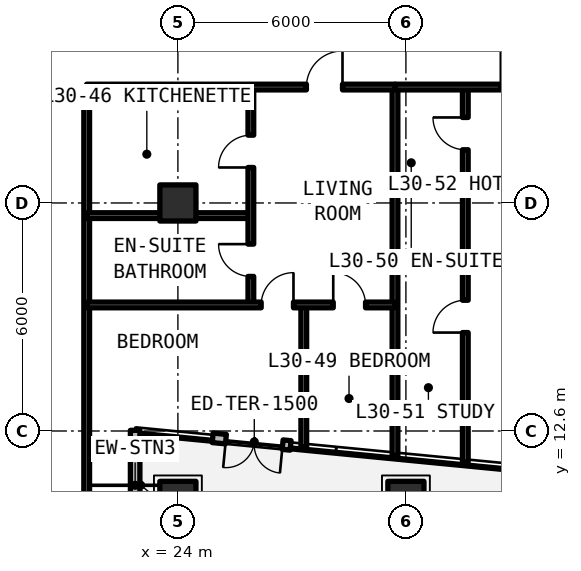
"""IFC4 building model, lengths in metres.
Left out: names, types, materials, properties, quantities, classifications, styles, units other than length and angle.
Written with IfcOpenShell. Run it as: python <this file> out.ifc"""

import sys

from ifc_helpers import new_model, si_unit, direction, frame, frame_2d, origin, origin_2d, place, context, subcontext, project, spatial, rectangle, extrude, element, fill, save


model = new_model("IFC4")
c1 = context("Model", 3, precision=1e-05, world=origin(), true_north=direction((0.0, 1.0)))
c2 = subcontext(c1, "Body", "Model", "MODEL_VIEW")
j1 = project(units=[si_unit("LENGTHUNIT", "METRE"), si_unit("PLANEANGLEUNIT", "RADIAN")], contexts=[c1])
p1 = place(None, origin())
s1 = spatial("IfcSite", under=j1, at=p1, CompositionType="ELEMENT")
p2 = place(p1, origin())
s2 = spatial("IfcBuilding", under=s1, at=p2, CompositionType="ELEMENT")
p3 = place(p2, frame((0.0, 0.0, 108.57)))
s3 = spatial("IfcBuildingStorey", under=s2, at=p3, CompositionType="ELEMENT", Elevation=108.57)
for number, where, z_axis, x_axis in (
    (1, (24.0, 18.6, 0.0), (0.0, 0.0, 1.0), (1.0, 0.0, 0.0)),
    (2, (24.0, 10.8, 0.0), (0.0, 0.0, 1.0), (1.0, 0.0, 0.0)),
    (3, (30.0, 10.8, 0.0), (0.0, 0.0, 1.0), (1.0, 0.0, 0.0)),
):
    element("IfcColumn", number, at=place(p3, frame(where, z_axis=z_axis, x_axis=x_axis)), inside=s3, PredefinedType="COLUMN", context=c2, shape_type="SweptSolid", body=[
        extrude(rectangle(XDim=0.95, YDim=0.95, at=origin_2d()), origin(), (0.0, 0.0, 1.0), 3.63),
    ])
p4 = place(p3, frame((22.875, 9.725, 0.0), z_axis=(0.0, 0.0, 1.0), x_axis=(0.0, 1.0, 0.0)))
e4 = element("IfcWall", 4, at=p4, inside=s3, PredefinedType="SOLIDWALL", context=c2, shape_type="SweptSolid", body=[
    extrude(rectangle(XDim=2.893, YDim=0.25, at=frame_2d((1.446, 0.0))), origin(), (0.0, 0.0, 1.0), 3.41),
])
p5 = place(p3, frame((24.915, 12.42, 0.0), z_axis=(0.0, 0.0, 1.0), x_axis=(0.995313658776, -0.096699124367, 0.0)))
e5 = element("IfcWall", 5, at=p5, inside=s3, PredefinedType="SOLIDWALL", context=c2, shape_type="SweptSolid", body=[
    extrude(rectangle(XDim=2.06, YDim=0.25, at=frame_2d((1.03, 0.0))), origin(), (0.0, 0.0, 1.0), 3.41),
])
p6 = place(p5, frame((0.35, 0.0, 0.0)))
e6 = element("IfcOpeningElement", 6, at=p6, cuts=e5, PredefinedType="OPENING", context=c2, shape_type="SweptSolid", body=[
    extrude(rectangle(XDim=1.5, YDim=2.2, at=frame_2d((0.75, 1.1))), frame((0.0, 0.135, 0.0), z_axis=(0.0, -1.0, 0.0), x_axis=(1.0, 0.0, 0.0)), (0.0, 0.0, 1.0), 0.27),
])
p7 = place(p3, frame((21.6, 9.725, 0.0), z_axis=(0.0, 0.0, 1.0), x_axis=(0.0, 1.0, 0.0)))
e7 = element("IfcWall", 7, at=p7, inside=s3, PredefinedType="SOLIDWALL", context=c2, shape_type="SweptSolid", body=[
    extrude(rectangle(XDim=11.925, YDim=0.15, at=frame_2d((5.962, 0.0))), origin(), (0.0, 0.0, 1.0), 2.63),
])
p8 = place(p3, frame((29.713, 11.954, 0.0), z_axis=(0.0, 0.0, 1.0), x_axis=(0.0, 1.0, 0.0)))
e8 = element("IfcWall", 8, at=p8, inside=s3, PredefinedType="SOLIDWALL", context=c2, shape_type="SweptSolid", body=[
    extrude(rectangle(XDim=9.696, YDim=0.15, at=frame_2d((4.848, 0.0))), origin(), (0.0, 0.0, 1.0), 2.63),
])
p9 = place(p3, frame((21.6, 18.267, 0.0), z_axis=(0.0, 0.0, 1.0), x_axis=(1.0, 0.0, 0.0)))
e9 = element("IfcWall", 9, at=p9, inside=s3, PredefinedType="PARTITIONING", context=c2, shape_type="SweptSolid", body=[
    extrude(rectangle(XDim=4.32, YDim=0.15, at=frame_2d((2.16, 0.0))), origin(), (0.0, 0.0, 1.0), 2.63),
])
p10 = place(p3, frame((25.92, 15.917, 0.0), z_axis=(0.0, 0.0, 1.0), x_axis=(0.0, 1.0, 0.0)))
e10 = element("IfcWall", 10, at=p10, inside=s3, PredefinedType="PARTITIONING", context=c2, shape_type="SweptSolid", body=[
    extrude(rectangle(XDim=5.733, YDim=0.15, at=frame_2d((2.867, 0.0))), origin(), (0.0, 0.0, 1.0), 2.63),
])
p11 = place(p10, frame((0.75, 0.0, 0.0)))
e11 = element("IfcOpeningElement", 11, at=p11, cuts=e10, PredefinedType="OPENING", context=c2, shape_type="SweptSolid", body=[
    extrude(rectangle(XDim=0.85, YDim=2.1, at=frame_2d((0.425, 1.05))), frame((0.0, 0.085, 0.0), z_axis=(0.0, -1.0, 0.0), x_axis=(1.0, 0.0, 0.0)), (0.0, 0.0, 1.0), 0.17),
])
p12 = place(p10, frame((3.617, 0.0, 0.0)))
e12 = element("IfcOpeningElement", 12, at=p12, cuts=e10, PredefinedType="OPENING", context=c2, shape_type="SweptSolid", body=[
    extrude(rectangle(XDim=0.85, YDim=2.1, at=frame_2d((0.425, 1.05))), frame((0.0, 0.085, 0.0), z_axis=(0.0, -1.0, 0.0), x_axis=(1.0, 0.0, 0.0)), (0.0, 0.0, 1.0), 0.17),
])
p13 = place(p3, frame((27.313, 12.187, 0.0), z_axis=(0.0, 0.0, 1.0), x_axis=(0.0, 1.0, 0.0)))
e13 = element("IfcWall", 13, at=p13, inside=s3, PredefinedType="PARTITIONING", context=c2, shape_type="SweptSolid", body=[
    extrude(rectangle(XDim=3.73, YDim=0.15, at=frame_2d((1.865, 0.0))), origin(), (0.0, 0.0, 1.0), 2.63),
])
p14 = place(p3, frame((21.6, 15.917, 0.0), z_axis=(0.0, 0.0, 1.0), x_axis=(1.0, 0.0, 0.0)))
e14 = element("IfcWall", 14, at=p14, inside=s3, PredefinedType="PARTITIONING", context=c2, shape_type="SweptSolid", body=[
    extrude(rectangle(XDim=8.113, YDim=0.15, at=frame_2d((4.056, 0.0))), origin(), (0.0, 0.0, 1.0), 2.63),
])
p15 = place(p14, frame((4.591, 0.0, 0.0)))
e15 = element("IfcOpeningElement", 15, at=p15, cuts=e14, PredefinedType="OPENING", context=c2, shape_type="SweptSolid", body=[
    extrude(rectangle(XDim=0.85, YDim=2.1, at=frame_2d((0.425, 1.05))), frame((0.0, 0.085, 0.0), z_axis=(0.0, -1.0, 0.0), x_axis=(1.0, 0.0, 0.0)), (0.0, 0.0, 1.0), 0.17),
])
p16 = place(p14, frame((6.488, 0.0, 0.0)))
e16 = element("IfcOpeningElement", 16, at=p16, cuts=e14, PredefinedType="OPENING", context=c2, shape_type="SweptSolid", body=[
    extrude(rectangle(XDim=0.85, YDim=2.1, at=frame_2d((0.425, 1.05))), frame((0.0, 0.085, 0.0), z_axis=(0.0, -1.0, 0.0), x_axis=(1.0, 0.0, 0.0)), (0.0, 0.0, 1.0), 0.17),
])
p17 = place(p3, frame((21.6, 21.65, 0.0), z_axis=(0.0, 0.0, 1.0), x_axis=(1.0, 0.0, 0.0)))
e17 = element("IfcWall", 17, at=p17, inside=s3, PredefinedType="SOLIDWALL", context=c2, shape_type="SweptSolid", body=[
    extrude(rectangle(XDim=8.113, YDim=0.15, at=frame_2d((4.056, 0.0))), origin(), (0.0, 0.0, 1.0), 2.63),
])
p18 = place(p17, frame((5.781, 0.0, 0.0)))
e18 = element("IfcOpeningElement", 18, at=p18, cuts=e17, PredefinedType="OPENING", context=c2, shape_type="SweptSolid", body=[
    extrude(rectangle(XDim=0.95, YDim=2.15, at=frame_2d((0.475, 1.075))), frame((0.0, 0.085, 0.0), z_axis=(0.0, -1.0, 0.0), x_axis=(1.0, 0.0, 0.0)), (0.0, 0.0, 1.0), 0.17),
])
p19 = place(p3, frame((29.713, 19.2, 0.0), z_axis=(0.0, 0.0, 1.0), x_axis=(1.0, 0.0, 0.0)))
e19 = element("IfcWall", 19, at=p19, inside=s3, PredefinedType="PARTITIONING", context=c2, shape_type="SweptSolid", body=[
    extrude(rectangle(XDim=1.85, YDim=0.15, at=frame_2d((0.925, 0.0))), origin(), (0.0, 0.0, 1.0), 2.63),
])
p20 = place(p3, frame((31.563, 11.774, 0.0), z_axis=(0.0, 0.0, 1.0), x_axis=(0.0, 1.0, 0.0)))
e20 = element("IfcWall", 20, at=p20, inside=s3, PredefinedType="PARTITIONING", context=c2, shape_type="SweptSolid", body=[
    extrude(rectangle(XDim=9.875, YDim=0.15, at=frame_2d((4.938, 0.0))), origin(), (0.0, 0.0, 1.0), 2.63),
])
p21 = place(p20, frame((3.416, 0.0, 0.0)))
e21 = element("IfcOpeningElement", 21, at=p21, cuts=e20, PredefinedType="OPENING", context=c2, shape_type="SweptSolid", body=[
    extrude(rectangle(XDim=0.85, YDim=2.1, at=frame_2d((0.425, 1.05))), frame((0.0, 0.085, 0.0), z_axis=(0.0, -1.0, 0.0), x_axis=(1.0, 0.0, 0.0)), (0.0, 0.0, 1.0), 0.17),
])
p22 = place(p20, frame((8.226, 0.0, 0.0)))
e22 = element("IfcOpeningElement", 22, at=p22, cuts=e20, PredefinedType="OPENING", context=c2, shape_type="SweptSolid", body=[
    extrude(rectangle(XDim=0.85, YDim=2.1, at=frame_2d((0.425, 1.05))), frame((0.0, 0.085, 0.0), z_axis=(0.0, -1.0, 0.0), x_axis=(1.0, 0.0, 0.0)), (0.0, 0.0, 1.0), 0.17),
])
p23 = place(p3, frame((29.713, 21.65, 0.0), z_axis=(0.0, 0.0, 1.0), x_axis=(1.0, 0.0, 0.0)))
e23 = element("IfcWall", 23, at=p23, inside=s3, PredefinedType="SOLIDWALL", context=c2, shape_type="SweptSolid", body=[
    extrude(rectangle(XDim=4.589, YDim=0.15, at=frame_2d((2.294, 0.0))), origin(), (0.0, 0.0, 1.0), 2.63),
])
p24 = place(p23, frame((2.784, 0.0, 0.0)))
e24 = element("IfcOpeningElement", 24, at=p24, cuts=e23, PredefinedType="OPENING", context=c2, shape_type="SweptSolid", body=[
    extrude(rectangle(XDim=0.95, YDim=2.15, at=frame_2d((0.475, 1.075))), frame((0.0, 0.085, 0.0), z_axis=(0.0, -1.0, 0.0), x_axis=(1.0, 0.0, 0.0)), (0.0, 0.0, 1.0), 0.17),
])
p25 = place(p6, frame((1.5, 0.0, 0.0), z_axis=(0.0, 0.0, 1.0), x_axis=(-1.0, 0.0, 0.0)))
e25 = element("IfcDoor", 25, at=p25, inside=s3, OperationType="SINGLE_SWING_RIGHT", PredefinedType="DOOR", context=c2, shape_type="SweptSolid", body=[
    extrude(rectangle(XDim=1.5, YDim=2.2, at=frame_2d((0.75, 1.1))), frame((0.0, 0.025, 0.0), z_axis=(0.0, -1.0, 0.0), x_axis=(1.0, 0.0, 0.0)), (0.0, 0.0, 1.0), 0.05),
])
fill(e6, e25)
p26 = place(p11, origin())
e26 = element("IfcDoor", 26, at=p26, inside=s3, OperationType="SINGLE_SWING_RIGHT", PredefinedType="DOOR", context=c2, shape_type="SweptSolid", body=[
    extrude(rectangle(XDim=0.85, YDim=2.1, at=frame_2d((0.425, 1.05))), frame((0.0, 0.025, 0.0), z_axis=(0.0, -1.0, 0.0), x_axis=(1.0, 0.0, 0.0)), (0.0, 0.0, 1.0), 0.05),
])
fill(e11, e26)
p27 = place(p12, origin())
e27 = element("IfcDoor", 27, at=p27, inside=s3, OperationType="SINGLE_SWING_LEFT", PredefinedType="DOOR", context=c2, shape_type="SweptSolid", body=[
    extrude(rectangle(XDim=0.85, YDim=2.1, at=frame_2d((0.425, 1.05))), frame((0.0, 0.025, 0.0), z_axis=(0.0, -1.0, 0.0), x_axis=(1.0, 0.0, 0.0)), (0.0, 0.0, 1.0), 0.05),
])
fill(e12, e27)
p28 = place(p15, origin())
e28 = element("IfcDoor", 28, at=p28, inside=s3, OperationType="SINGLE_SWING_RIGHT", PredefinedType="DOOR", context=c2, shape_type="SweptSolid", body=[
    extrude(rectangle(XDim=0.85, YDim=2.1, at=frame_2d((0.425, 1.05))), frame((0.0, 0.025, 0.0), z_axis=(0.0, -1.0, 0.0), x_axis=(1.0, 0.0, 0.0)), (0.0, 0.0, 1.0), 0.05),
])
fill(e15, e28)
p29 = place(p16, origin())
e29 = element("IfcDoor", 29, at=p29, inside=s3, OperationType="SINGLE_SWING_LEFT", PredefinedType="DOOR", context=c2, shape_type="SweptSolid", body=[
    extrude(rectangle(XDim=0.85, YDim=2.1, at=frame_2d((0.425, 1.05))), frame((0.0, 0.025, 0.0), z_axis=(0.0, -1.0, 0.0), x_axis=(1.0, 0.0, 0.0)), (0.0, 0.0, 1.0), 0.05),
])
fill(e16, e29)
p30 = place(p18, origin())
e30 = element("IfcDoor", 30, at=p30, inside=s3, OperationType="SINGLE_SWING_RIGHT", PredefinedType="DOOR", context=c2, shape_type="SweptSolid", body=[
    extrude(rectangle(XDim=0.95, YDim=2.15, at=frame_2d((0.475, 1.075))), frame((0.0, 0.025, 0.0), z_axis=(0.0, -1.0, 0.0), x_axis=(1.0, 0.0, 0.0)), (0.0, 0.0, 1.0), 0.05),
])
fill(e18, e30)
p31 = place(p21, origin())
e31 = element("IfcDoor", 31, at=p31, inside=s3, OperationType="SINGLE_SWING_LEFT", PredefinedType="DOOR", context=c2, shape_type="SweptSolid", body=[
    extrude(rectangle(XDim=0.85, YDim=2.1, at=frame_2d((0.425, 1.05))), frame((0.0, 0.025, 0.0), z_axis=(0.0, -1.0, 0.0), x_axis=(1.0, 0.0, 0.0)), (0.0, 0.0, 1.0), 0.05),
])
fill(e21, e31)
p32 = place(p22, origin())
e32 = element("IfcDoor", 32, at=p32, inside=s3, OperationType="SINGLE_SWING_RIGHT", PredefinedType="DOOR", context=c2, shape_type="SweptSolid", body=[
    extrude(rectangle(XDim=0.85, YDim=2.1, at=frame_2d((0.425, 1.05))), frame((0.0, 0.025, 0.0), z_axis=(0.0, -1.0, 0.0), x_axis=(1.0, 0.0, 0.0)), (0.0, 0.0, 1.0), 0.05),
])
fill(e22, e32)
p33 = place(p24, origin())
e33 = element("IfcDoor", 33, at=p33, inside=s3, OperationType="SINGLE_SWING_LEFT", PredefinedType="DOOR", context=c2, shape_type="SweptSolid", body=[
    extrude(rectangle(XDim=0.95, YDim=2.15, at=frame_2d((0.475, 1.075))), frame((0.0, 0.025, 0.0), z_axis=(0.0, -1.0, 0.0), x_axis=(1.0, 0.0, 0.0)), (0.0, 0.0, 1.0), 0.05),
])
fill(e24, e33)
save(model, sys.argv[1])
